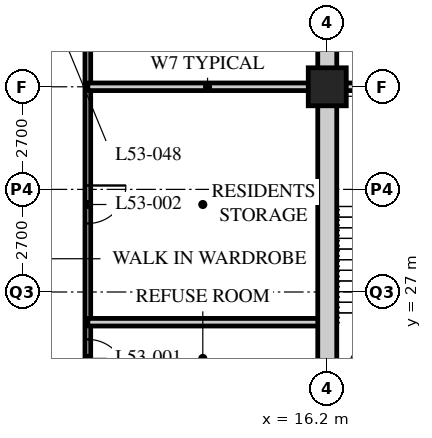
"""IFC4 building model, lengths in metres.
Left out: names, types, materials, properties, quantities, classifications, styles, units other than length and angle.
Written with IfcOpenShell. Run it as: python <this file> out.ifc"""

import sys

from ifc_helpers import new_model, si_unit, direction, frame, frame_2d, origin, origin_2d, place, context, subcontext, project, spatial, rectangle, hollow_rectangle, extrude, element, fill, save


model = new_model("IFC4")
c1 = context("Model", 3, precision=1e-05, world=origin(), true_north=direction((0.0, 1.0)))
c2 = subcontext(c1, "Body", "Model", "MODEL_VIEW")
j1 = project(units=[si_unit("LENGTHUNIT", "METRE"), si_unit("PLANEANGLEUNIT", "RADIAN")], contexts=[c1])
p1 = place(None, origin())
s1 = spatial("IfcSite", under=j1, at=p1, CompositionType="ELEMENT")
p2 = place(p1, origin())
s2 = spatial("IfcBuilding", under=s1, at=p2, CompositionType="ELEMENT")
p3 = place(p2, frame((0.0, 0.0, 206.4)))
s3 = spatial("IfcBuildingStorey", under=s2, at=p3, CompositionType="ELEMENT", Elevation=206.4)
p4 = place(p3, frame((16.2, 32.4, 0.0), z_axis=(0.0, 0.0, 1.0), x_axis=(1.0, 0.0, 0.0)))
e1 = element("IfcColumn", 1, at=p4, inside=s3, PredefinedType="COLUMN", context=c2, shape_type="SweptSolid", body=[
    extrude(hollow_rectangle(XDim=1.0, YDim=1.0, WallThickness=0.1, at=origin_2d()), origin(), (0.0, 0.0, 1.0), 3.6),
])
p5 = place(p3, frame((9.9, 45.45, 0.0), z_axis=(0.0, 0.0, 1.0), x_axis=(0.0, -1.0, 0.0)))
e2 = element("IfcWall", 2, at=p5, inside=s3, PredefinedType="PARTITIONING", context=c2, shape_type="SweptSolid", body=[
    extrude(rectangle(XDim=24.75, YDim=0.15, at=frame_2d((12.375, 0.0))), origin(), (0.0, 0.0, 1.0), 3.39),
])
p6 = place(p5, frame((19.698, 0.0, 0.0)))
e3 = element("IfcOpeningElement", 3, at=p6, cuts=e2, PredefinedType="OPENING", context=c2, shape_type="SweptSolid", body=[
    extrude(rectangle(XDim=1.0, YDim=2.1, at=frame_2d((0.5, 1.05))), frame((0.0, 0.085, 0.0), z_axis=(0.0, -1.0, 0.0), x_axis=(1.0, 0.0, 0.0)), (0.0, 0.0, 1.0), 0.17),
])
p7 = place(p5, frame((15.648, 0.0, 0.0)))
e4 = element("IfcOpeningElement", 4, at=p7, cuts=e2, PredefinedType="OPENING", context=c2, shape_type="SweptSolid", body=[
    extrude(rectangle(XDim=1.0, YDim=2.1, at=frame_2d((0.5, 1.05))), frame((0.0, 0.085, 0.0), z_axis=(0.0, -1.0, 0.0), x_axis=(1.0, 0.0, 0.0)), (0.0, 0.0, 1.0), 0.17),
])
p8 = place(p5, frame((10.248, 0.0, 0.0)))
e5 = element("IfcOpeningElement", 5, at=p8, cuts=e2, PredefinedType="OPENING", context=c2, shape_type="SweptSolid", body=[
    extrude(rectangle(XDim=1.0, YDim=2.1, at=frame_2d((0.5, 1.05))), frame((0.0, 0.085, 0.0), z_axis=(0.0, -1.0, 0.0), x_axis=(1.0, 0.0, 0.0)), (0.0, 0.0, 1.0), 0.17),
])
p9 = place(p5, frame((6.198, 0.0, 0.0)))
e6 = element("IfcOpeningElement", 6, at=p9, cuts=e2, PredefinedType="OPENING", context=c2, shape_type="SweptSolid", body=[
    extrude(rectangle(XDim=1.0, YDim=2.1, at=frame_2d((0.5, 1.05))), frame((0.0, 0.085, 0.0), z_axis=(0.0, -1.0, 0.0), x_axis=(1.0, 0.0, 0.0)), (0.0, 0.0, 1.0), 0.17),
])
for number, where, z_axis, x_axis in (
    (7, (9.9, 32.4, 0.0), (0.0, 0.0, 1.0), (1.0, 0.0, 0.0)),
    (8, (9.9, 26.205, 0.0), (0.0, 0.0, 1.0), (1.0, 0.0, 0.0)),
):
    element("IfcWall", number, at=place(p3, frame(where, z_axis=z_axis, x_axis=x_axis)), inside=s3, PredefinedType="SOLIDWALL", context=c2, shape_type="SweptSolid", body=[
        extrude(rectangle(XDim=6.3, YDim=0.2, at=frame_2d((3.15, 0.0))), origin(), (0.0, 0.0, 1.0), 3.39),
    ])
p10 = place(p3, frame((16.2, 24.55, 0.0), z_axis=(0.0, 0.0, 1.0), x_axis=(0.0, 1.0, 0.0)))
e9 = element("IfcWall", 9, at=p10, inside=s3, PredefinedType="SOLIDWALL", context=c2, shape_type="SweptSolid", body=[
    extrude(rectangle(XDim=15.7, YDim=0.5, at=frame_2d((7.85, 0.0))), origin(), (0.0, 0.0, 1.0), 2.778),
])
p11 = place(p3, frame((16.45, 32.4, 0.0), z_axis=(0.0, 0.0, 1.0), x_axis=(1.0, 0.0, 0.0)))
e10 = element("IfcWall", 10, at=p11, inside=s3, PredefinedType="SOLIDWALL", context=c2, shape_type="SweptSolid", body=[
    extrude(rectangle(XDim=7.95, YDim=0.2, at=frame_2d((3.975, 0.0))), origin(), (0.0, 0.0, 1.0), 2.778),
])
p12 = place(p6, origin())
e11 = element("IfcDoor", 11, at=p12, inside=s3, OperationType="SINGLE_SWING_RIGHT", PredefinedType="DOOR", context=c2, shape_type="SweptSolid", body=[
    extrude(rectangle(XDim=1.0, YDim=2.1, at=frame_2d((0.5, 1.05))), frame((0.0, 0.025, 0.0), z_axis=(0.0, -1.0, 0.0), x_axis=(1.0, 0.0, 0.0)), (0.0, 0.0, 1.0), 0.05),
])
fill(e3, e11)
p13 = place(p7, origin())
e12 = element("IfcDoor", 12, at=p13, inside=s3, OperationType="SINGLE_SWING_LEFT", PredefinedType="DOOR", context=c2, shape_type="SweptSolid", body=[
    extrude(rectangle(XDim=1.0, YDim=2.1, at=frame_2d((0.5, 1.05))), frame((0.0, 0.025, 0.0), z_axis=(0.0, -1.0, 0.0), x_axis=(1.0, 0.0, 0.0)), (0.0, 0.0, 1.0), 0.05),
])
fill(e4, e12)
save(model, sys.argv[1])
